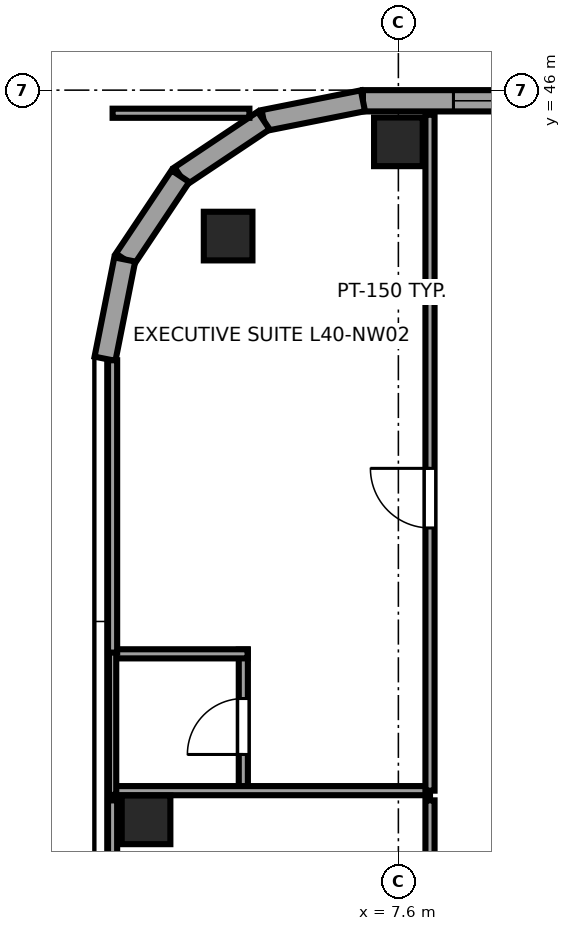
"""IFC4 building model, lengths in metres.
Left out: names, types, materials, properties, quantities, classifications, styles, units other than length and angle.
Written with IfcOpenShell. Run it as: python <this file> out.ifc"""

import sys

from ifc_helpers import new_model, si_unit, direction, frame, frame_2d, origin, origin_2d, place, context, subcontext, project, spatial, rectangle, extrude, source, transform, mapped, element, fill, save


model = new_model("IFC4")
c1 = context("Model", 3, precision=1e-05, world=origin(), true_north=direction((0.0, 1.0)))
c2 = subcontext(c1, "Body", "Model", "MODEL_VIEW")
j1 = project(units=[si_unit("LENGTHUNIT", "METRE"), si_unit("PLANEANGLEUNIT", "RADIAN")], contexts=[c1])
p1 = place(None, origin())
s1 = spatial("IfcSite", under=j1, at=p1, CompositionType="ELEMENT")
p2 = place(p1, origin())
s2 = spatial("IfcBuilding", under=s1, at=p2, CompositionType="ELEMENT")
p3 = place(p2, frame((0.0, 0.0, 154.15)))
s3 = spatial("IfcBuildingStorey", under=s2, at=p3, CompositionType="ELEMENT", Elevation=154.15)
m1 = source(origin(), c2, "Body", "SweptSolid", [
    extrude(rectangle(XDim=0.8, YDim=0.8, at=origin_2d()), origin(), (0.0, 0.0, 1.0), 3.55),
])
for number, where, z_axis, x_axis in (
    (1, (4.8, 43.6, 0.0), (0.0, 0.0, 1.0), (1.0, 0.0, 0.0)),
    (2, (7.6, 45.15, 0.0), (0.0, 0.0, 1.0), (1.0, 0.0, 0.0)),
    (3, (3.45, 34.0, 0.0), (0.0, 0.0, 1.0), (1.0, 0.0, 0.0)),
):
    element("IfcColumn", number, at=place(p3, frame(where, z_axis=z_axis, x_axis=x_axis)), inside=s3, PredefinedType="COLUMN", context=c2, shape_type="MappedRepresentation", body=[
        mapped(m1, transform((0.0, 0.0, 0.0), x_axis=(1.0, 0.0, 0.0), y_axis=(0.0, 1.0, 0.0), z_axis=(0.0, 0.0, 1.0), scale=1.0)),
    ])
p4 = place(p3, frame((49.983, 45.825, 0.0), z_axis=(0.0, 0.0, 1.0), x_axis=(-1.0, 0.0, 0.0)))
e4 = element("IfcWall", 4, at=p4, inside=s3, PredefinedType="SOLIDWALL", context=c2, shape_type="SweptSolid", body=[
    extrude(rectangle(XDim=42.966, YDim=0.35, at=frame_2d((21.483, 0.0))), origin(), (0.0, 0.0, 1.0), 3.37),
])
p5 = place(p4, frame((1.488, 0.0, 0.68)))
e5 = element("IfcOpeningElement", 5, at=p5, cuts=e4, PredefinedType="OPENING", context=c2, shape_type="SweptSolid", body=[
    extrude(rectangle(XDim=2.4, YDim=1.9, at=frame_2d((1.2, 0.95))), frame((0.0, 0.185, 0.0), z_axis=(0.0, -1.0, 0.0), x_axis=(1.0, 0.0, 0.0)), (0.0, 0.0, 1.0), 0.37),
])
p6 = place(p4, frame((9.841, 0.0, 0.68)))
e6 = element("IfcOpeningElement", 6, at=p6, cuts=e4, PredefinedType="OPENING", context=c2, shape_type="SweptSolid", body=[
    extrude(rectangle(XDim=2.4, YDim=1.9, at=frame_2d((1.2, 0.95))), frame((0.0, 0.185, 0.0), z_axis=(0.0, -1.0, 0.0), x_axis=(1.0, 0.0, 0.0)), (0.0, 0.0, 1.0), 0.37),
])
p7 = place(p4, frame((14.018, 0.0, 0.68)))
e7 = element("IfcOpeningElement", 7, at=p7, cuts=e4, PredefinedType="OPENING", context=c2, shape_type="SweptSolid", body=[
    extrude(rectangle(XDim=2.4, YDim=1.9, at=frame_2d((1.2, 0.95))), frame((0.0, 0.185, 0.0), z_axis=(0.0, -1.0, 0.0), x_axis=(1.0, 0.0, 0.0)), (0.0, 0.0, 1.0), 0.37),
])
p8 = place(p4, frame((18.195, 0.0, 0.68)))
e8 = element("IfcOpeningElement", 8, at=p8, cuts=e4, PredefinedType="OPENING", context=c2, shape_type="SweptSolid", body=[
    extrude(rectangle(XDim=2.4, YDim=1.9, at=frame_2d((1.2, 0.95))), frame((0.0, 0.185, 0.0), z_axis=(0.0, -1.0, 0.0), x_axis=(1.0, 0.0, 0.0)), (0.0, 0.0, 1.0), 0.37),
])
p9 = place(p4, frame((22.371, 0.0, 0.68)))
e9 = element("IfcOpeningElement", 9, at=p9, cuts=e4, PredefinedType="OPENING", context=c2, shape_type="SweptSolid", body=[
    extrude(rectangle(XDim=2.4, YDim=1.9, at=frame_2d((1.2, 0.95))), frame((0.0, 0.185, 0.0), z_axis=(0.0, -1.0, 0.0), x_axis=(1.0, 0.0, 0.0)), (0.0, 0.0, 1.0), 0.37),
])
p10 = place(p4, frame((26.548, 0.0, 0.68)))
e10 = element("IfcOpeningElement", 10, at=p10, cuts=e4, PredefinedType="OPENING", context=c2, shape_type="SweptSolid", body=[
    extrude(rectangle(XDim=2.4, YDim=1.9, at=frame_2d((1.2, 0.95))), frame((0.0, 0.185, 0.0), z_axis=(0.0, -1.0, 0.0), x_axis=(1.0, 0.0, 0.0)), (0.0, 0.0, 1.0), 0.37),
])
p11 = place(p4, frame((30.724, 0.0, 0.68)))
e11 = element("IfcOpeningElement", 11, at=p11, cuts=e4, PredefinedType="OPENING", context=c2, shape_type="SweptSolid", body=[
    extrude(rectangle(XDim=2.4, YDim=1.9, at=frame_2d((1.2, 0.95))), frame((0.0, 0.185, 0.0), z_axis=(0.0, -1.0, 0.0), x_axis=(1.0, 0.0, 0.0)), (0.0, 0.0, 1.0), 0.37),
])
p12 = place(p4, frame((34.901, 0.0, 0.68)))
e12 = element("IfcOpeningElement", 12, at=p12, cuts=e4, PredefinedType="OPENING", context=c2, shape_type="SweptSolid", body=[
    extrude(rectangle(XDim=2.4, YDim=1.9, at=frame_2d((1.2, 0.95))), frame((0.0, 0.185, 0.0), z_axis=(0.0, -1.0, 0.0), x_axis=(1.0, 0.0, 0.0)), (0.0, 0.0, 1.0), 0.37),
])
p13 = place(p4, frame((39.077, 0.0, 0.68)))
e13 = element("IfcOpeningElement", 13, at=p13, cuts=e4, PredefinedType="OPENING", context=c2, shape_type="SweptSolid", body=[
    extrude(rectangle(XDim=2.4, YDim=1.9, at=frame_2d((1.2, 0.95))), frame((0.0, 0.185, 0.0), z_axis=(0.0, -1.0, 0.0), x_axis=(1.0, 0.0, 0.0)), (0.0, 0.0, 1.0), 0.37),
])
p14 = place(p3, frame((7.017, 45.825, 0.0), z_axis=(0.0, 0.0, 1.0), x_axis=(-0.980788844421, -0.195072403631, 0.0)))
e14 = element("IfcWall", 14, at=p14, inside=s3, PredefinedType="SOLIDWALL", context=c2, shape_type="SweptSolid", body=[
    extrude(rectangle(XDim=1.665, YDim=0.35, at=frame_2d((0.832, 0.0))), origin(), (0.0, 0.0, 1.0), 3.37),
])
for number, where, z_axis, x_axis in (
    (15, (5.385, 45.5, 0.0), (0.0, 0.0, 1.0), (-0.832, -0.556, 0.0)),
    (16, (4.015, 44.585, 0.0), (0.0, 0.0, 1.0), (-0.556, -0.831, 0.0)),
):
    element("IfcWall", number, at=place(p3, frame(where, z_axis=z_axis, x_axis=x_axis)), inside=s3, PredefinedType="SOLIDWALL", context=c2, shape_type="SweptSolid", body=[
        extrude(rectangle(XDim=1.647, YDim=0.35, at=frame_2d((0.824, 0.0))), origin(), (0.0, 0.0, 1.0), 2.832),
    ])
p15 = place(p3, frame((3.1, 43.216, 0.0), z_axis=(0.0, 0.0, 1.0), x_axis=(-0.195044345786, -0.980794424524, 0.0)))
e17 = element("IfcWall", 17, at=p15, inside=s3, PredefinedType="SOLIDWALL", context=c2, shape_type="SweptSolid", body=[
    extrude(rectangle(XDim=1.665, YDim=0.35, at=frame_2d((0.833, 0.0))), origin(), (0.0, 0.0, 1.0), 3.37),
])
p16 = place(p3, frame((5.05, 34.41, 0.0), z_axis=(0.0, 0.0, 1.0), x_axis=(0.0, 1.0, 0.0)))
e18 = element("IfcWall", 18, at=p16, inside=s3, PredefinedType="PARTITIONING", context=c2, shape_type="SweptSolid", body=[
    extrude(rectangle(XDim=2.39, YDim=0.15, at=frame_2d((1.195, 0.0))), origin(), (0.0, 0.0, 1.0), 3.37),
])
p17 = place(p16, frame((0.665, 0.0, 0.0)))
e19 = element("IfcOpeningElement", 19, at=p17, cuts=e18, PredefinedType="OPENING", context=c2, shape_type="SweptSolid", body=[
    extrude(rectangle(XDim=0.92, YDim=2.01, at=frame_2d((0.46, 1.005))), frame((0.0, 0.085, 0.0), z_axis=(0.0, -1.0, 0.0), x_axis=(1.0, 0.0, 0.0)), (0.0, 0.0, 1.0), 0.17),
])
p18 = place(p3, frame((2.83, 34.48, 0.0), z_axis=(0.0, 0.0, 1.0), x_axis=(1.0, 0.0, 0.0)))
e20 = element("IfcWall", 20, at=p18, inside=s3, PredefinedType="PARTITIONING", context=c2, shape_type="SweptSolid", body=[
    extrude(rectangle(XDim=5.29, YDim=0.15, at=frame_2d((2.645, 0.0))), origin(), (0.0, 0.0, 1.0), 3.37),
])
p19 = place(p3, frame((2.83, 36.73, 0.0), z_axis=(0.0, 0.0, 1.0), x_axis=(1.0, 0.0, 0.0)))
e21 = element("IfcWall", 21, at=p19, inside=s3, PredefinedType="PARTITIONING", context=c2, shape_type="SweptSolid", body=[
    extrude(rectangle(XDim=2.29, YDim=0.15, at=frame_2d((1.145, 0.0))), origin(), (0.0, 0.0, 1.0), 3.37),
])
p20 = place(p3, frame((2.9, 34.41, 0.0), z_axis=(0.0, 0.0, 1.0), x_axis=(0.0, 1.0, 0.0)))
e22 = element("IfcWall", 22, at=p20, inside=s3, PredefinedType="PLUMBINGWALL", context=c2, shape_type="SweptSolid", body=[
    extrude(rectangle(XDim=2.39, YDim=0.12, at=frame_2d((1.195, 0.0))), origin(), (0.0, 0.0, 1.0), 3.37),
])
p21 = place(p3, frame((8.12, 23.58, 0.0), z_axis=(0.0, 0.0, 1.0), x_axis=(0.0, 1.0, 0.0)))
e23 = element("IfcWall", 23, at=p21, inside=s3, PredefinedType="PARTITIONING", context=c2, shape_type="SweptSolid", body=[
    extrude(rectangle(XDim=10.74, YDim=0.15, at=frame_2d((5.37, 0.0))), origin(), (0.0, 0.0, 1.0), 3.37),
])
p22 = place(p21, frame((4.88, 0.0, 0.0)))
e24 = element("IfcOpeningElement", 24, at=p22, cuts=e23, PredefinedType="OPENING", context=c2, shape_type="SweptSolid", body=[
    extrude(rectangle(XDim=0.98, YDim=2.12, at=frame_2d((0.49, 1.06))), frame((0.0, 0.085, 0.0), z_axis=(0.0, -1.0, 0.0), x_axis=(1.0, 0.0, 0.0)), (0.0, 0.0, 1.0), 0.17),
])
p23 = place(p3, frame((2.9, 25.83, 0.0), z_axis=(0.0, 0.0, 1.0), x_axis=(0.0, 1.0, 0.0)))
e25 = element("IfcWall", 25, at=p23, inside=s3, PredefinedType="PARTITIONING", context=c2, shape_type="SweptSolid", body=[
    extrude(rectangle(XDim=8.49, YDim=0.15, at=frame_2d((4.245, 0.0))), origin(), (0.0, 0.0, 1.0), 3.37),
])
p24 = place(p3, frame((8.12, 34.48, 0.0), z_axis=(0.0, 0.0, 1.0), x_axis=(0.0, 1.0, 0.0)))
e26 = element("IfcWall", 26, at=p24, inside=s3, PredefinedType="PARTITIONING", context=c2, shape_type="SweptSolid", body=[
    extrude(rectangle(XDim=11.115, YDim=0.15, at=frame_2d((5.558, 0.0))), origin(), (0.0, 0.0, 1.0), 3.37),
])
p25 = place(p24, frame((4.32, 0.0, 0.0)))
e27 = element("IfcOpeningElement", 27, at=p25, cuts=e26, PredefinedType="OPENING", context=c2, shape_type="SweptSolid", body=[
    extrude(rectangle(XDim=0.98, YDim=2.12, at=frame_2d((0.49, 1.06))), frame((0.0, 0.085, 0.0), z_axis=(0.0, -1.0, 0.0), x_axis=(1.0, 0.0, 0.0)), (0.0, 0.0, 1.0), 0.17),
])
p26 = place(p3, frame((2.9, 45.62, 0.0), z_axis=(0.0, 0.0, 1.0), x_axis=(1.0, 0.0, 0.0)))
e28 = element("IfcWall", 28, at=p26, inside=s3, PredefinedType="PARTITIONING", context=c2, shape_type="SweptSolid", body=[
    extrude(rectangle(XDim=2.25, YDim=0.15, at=frame_2d((1.125, 0.0))), origin(), (0.0, 0.0, 1.0), 3.37),
])
p27 = place(p3, frame((2.9, 36.75, 0.0), z_axis=(0.0, 0.0, 1.0), x_axis=(0.0, 1.0, 0.0)))
e29 = element("IfcWall", 29, at=p27, inside=s3, PredefinedType="PARTITIONING", context=c2, shape_type="SweptSolid", body=[
    extrude(rectangle(XDim=4.808, YDim=0.15, at=frame_2d((2.404, 0.0))), origin(), (0.0, 0.0, 1.0), 3.37),
])
m2 = source(origin(), c2, "Body", "SweptSolid", [
    extrude(rectangle(XDim=2.4, YDim=1.9, at=frame_2d((1.2, 0.95))), frame((0.0, 0.09, 0.0), z_axis=(0.0, -1.0, 0.0), x_axis=(1.0, 0.0, 0.0)), (0.0, 0.0, 1.0), 0.06),
])
p28 = place(p13, origin())
e30 = element("IfcWindow", 30, at=p28, inside=s3, PartitioningType="TRIPLE_PANEL_HORIZONTAL", PredefinedType="WINDOW", context=c2, shape_type="MappedRepresentation", body=[
    mapped(m2, transform((0.0, 0.0, 0.0), x_axis=(1.0, 0.0, 0.0), y_axis=(0.0, 1.0, 0.0), z_axis=(0.0, 0.0, 1.0), scale=1.0)),
])
fill(e13, e30)
m3 = source(origin(), c2, "Body", "SweptSolid", [
    extrude(rectangle(XDim=0.92, YDim=2.01, at=frame_2d((0.46, 1.005))), frame((0.0, 0.025, 0.0), z_axis=(0.0, -1.0, 0.0), x_axis=(1.0, 0.0, 0.0)), (0.0, 0.0, 1.0), 0.05),
])
p29 = place(p17, origin())
e31 = element("IfcDoor", 31, at=p29, inside=s3, OperationType="SINGLE_SWING_LEFT", PredefinedType="DOOR", context=c2, shape_type="MappedRepresentation", body=[
    mapped(m3, transform((0.0, 0.0, 0.0), x_axis=(1.0, 0.0, 0.0), y_axis=(0.0, 1.0, 0.0), z_axis=(0.0, 0.0, 1.0), scale=1.0)),
])
fill(e19, e31)
m4 = source(origin(), c2, "Body", "SweptSolid", [
    extrude(rectangle(XDim=0.98, YDim=2.12, at=frame_2d((0.49, 1.06))), frame((0.0, 0.025, 0.0), z_axis=(0.0, -1.0, 0.0), x_axis=(1.0, 0.0, 0.0)), (0.0, 0.0, 1.0), 0.05),
])
p30 = place(p25, origin())
e32 = element("IfcDoor", 32, at=p30, inside=s3, OperationType="SINGLE_SWING_RIGHT", PredefinedType="DOOR", context=c2, shape_type="MappedRepresentation", body=[
    mapped(m4, transform((0.0, 0.0, 0.0), x_axis=(1.0, 0.0, 0.0), y_axis=(0.0, 1.0, 0.0), z_axis=(0.0, 0.0, 1.0), scale=1.0)),
])
fill(e27, e32)
save(model, sys.argv[1])
